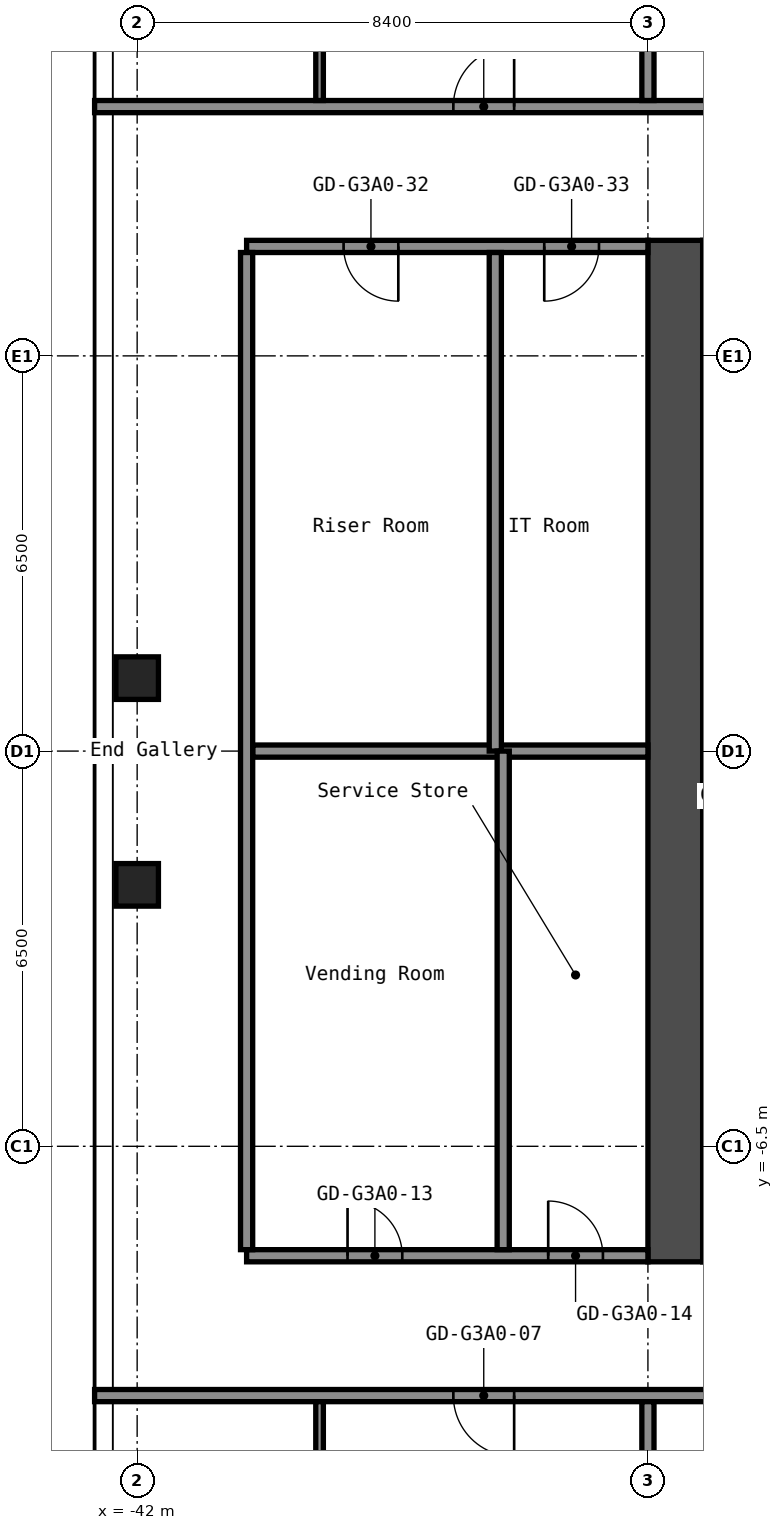
"""IFC4 building model, lengths in metres.
Left out: names, types, materials, properties, quantities, classifications, styles, units other than length and angle.
Written with IfcOpenShell. Run it as: python <this file> out.ifc"""

import sys

from ifc_helpers import new_model, si_unit, direction, frame, frame_2d, origin, origin_2d, place, context, subcontext, project, spatial, rectangle, hollow_rectangle, extrude, element, fill, save


model = new_model("IFC4")
c1 = context("Model", 3, precision=1e-05, world=origin(), true_north=direction((0.0, 1.0)))
c2 = subcontext(c1, "Body", "Model", "MODEL_VIEW")
j1 = project(units=[si_unit("LENGTHUNIT", "METRE"), si_unit("PLANEANGLEUNIT", "RADIAN")], contexts=[c1])
p1 = place(None, origin())
s1 = spatial("IfcSite", under=j1, at=p1, CompositionType="ELEMENT")
p2 = place(p1, origin())
s2 = spatial("IfcBuilding", under=s1, at=p2, CompositionType="ELEMENT")
p3 = place(p2, frame((0.0, 0.0, 131.0)))
s3 = spatial("IfcBuildingStorey", under=s2, at=p3, CompositionType="ELEMENT", Elevation=131.0)
for number, where, z_axis, x_axis in (
    (1, (-42.0, -2.2, 0.0), (0.0, 0.0, 1.0), (1.0, 0.0, 0.0)),
    (2, (-42.0, 1.2, 0.0), (0.0, 0.0, 1.0), (1.0, 0.0, 0.0)),
):
    element("IfcColumn", number, at=place(p3, frame(where, z_axis=z_axis, x_axis=x_axis)), inside=s3, PredefinedType="COLUMN", context=c2, shape_type="SweptSolid", body=[
        extrude(hollow_rectangle(XDim=0.7, YDim=0.7, WallThickness=0.028, at=origin_2d()), origin(), (0.0, 0.0, 1.0), 2.75),
    ])
p4 = place(p3, frame((-33.15, -8.4, 0.0), z_axis=(0.0, 0.0, 1.0), x_axis=(0.0, 1.0, 0.0)))
e3 = element("IfcWall", 3, at=p4, inside=s3, PredefinedType="SHEAR", context=c2, shape_type="SweptSolid", body=[
    extrude(rectangle(XDim=16.8, YDim=0.9, at=frame_2d((8.4, 0.0))), origin(), (0.0, 0.0, 1.0), 2.75),
])
p5 = place(p3, frame((-32.7, 1.325, 0.0), z_axis=(0.0, 0.0, 1.0), x_axis=(1.0, 0.0, 0.0)))
e4 = element("IfcWall", 4, at=p5, inside=s3, PredefinedType="SHEAR", context=c2, shape_type="SweptSolid", body=[
    extrude(rectangle(XDim=5.05, YDim=0.25, at=frame_2d((2.525, 0.0))), origin(), (0.0, 0.0, 1.0), 2.75),
])
p6 = place(p5, frame((3.3, 0.0, 0.0)))
e5 = element("IfcOpeningElement", 5, at=p6, cuts=e4, PredefinedType="OPENING", context=c2, shape_type="SweptSolid", body=[
    extrude(rectangle(XDim=1.2, YDim=2.1, at=frame_2d((0.6, 1.05))), frame((0.0, 0.135, 0.0), z_axis=(0.0, -1.0, 0.0), x_axis=(1.0, 0.0, 0.0)), (0.0, 0.0, 1.0), 0.27),
])
p7 = place(p3, frame((-32.7, -3.625, 0.0), z_axis=(0.0, 0.0, 1.0), x_axis=(1.0, 0.0, 0.0)))
e6 = element("IfcWall", 6, at=p7, inside=s3, PredefinedType="SHEAR", context=c2, shape_type="SweptSolid", body=[
    extrude(rectangle(XDim=4.55, YDim=0.25, at=frame_2d((2.275, 0.0))), origin(), (0.0, 0.0, 1.0), 2.75),
])
p8 = place(p7, frame((2.85, 0.0, 0.0)))
e7 = element("IfcOpeningElement", 7, at=p8, cuts=e6, PredefinedType="OPENING", context=c2, shape_type="SweptSolid", body=[
    extrude(rectangle(XDim=1.1, YDim=2.1, at=frame_2d((0.55, 1.05))), frame((0.0, 0.135, 0.0), z_axis=(0.0, -1.0, 0.0), x_axis=(1.0, 0.0, 0.0)), (0.0, 0.0, 1.0), 0.27),
])
p9 = place(p7, frame((0.6, 0.0, 0.0)))
e8 = element("IfcOpeningElement", 8, at=p9, cuts=e6, PredefinedType="OPENING", context=c2, shape_type="SweptSolid", body=[
    extrude(rectangle(XDim=1.1, YDim=2.1, at=frame_2d((0.55, 1.05))), frame((0.0, 0.135, 0.0), z_axis=(0.0, -1.0, 0.0), x_axis=(1.0, 0.0, 0.0)), (0.0, 0.0, 1.0), 0.27),
])
p10 = place(p3, frame((-32.7, -6.75, 0.0), z_axis=(0.0, 0.0, 1.0), x_axis=(1.0, 0.0, 0.0)))
e9 = element("IfcWall", 9, at=p10, inside=s3, PredefinedType="SHEAR", context=c2, shape_type="SweptSolid", body=[
    extrude(rectangle(XDim=4.55, YDim=1.5, at=frame_2d((2.275, 0.0))), origin(), (0.0, 0.0, 1.0), 2.75),
])
p11 = place(p3, frame((-42.7, -10.6, 0.0), z_axis=(0.0, 0.0, 1.0), x_axis=(1.0, 0.0, 0.0)))
e10 = element("IfcWall", 10, at=p11, inside=s3, PredefinedType="PARTITIONING", context=c2, shape_type="SweptSolid", body=[
    extrude(rectangle(XDim=25.9, YDim=0.2, at=frame_2d((12.95, 0.0))), origin(), (0.0, 0.0, 1.0), 2.75),
])
p12 = place(p11, frame((5.9, 0.0, 0.0)))
e11 = element("IfcOpeningElement", 11, at=p12, cuts=e10, PredefinedType="OPENING", context=c2, shape_type="SweptSolid", body=[
    extrude(rectangle(XDim=1.0, YDim=2.1, at=frame_2d((0.5, 1.05))), frame((0.0, 0.11, 0.0), z_axis=(0.0, -1.0, 0.0), x_axis=(1.0, 0.0, 0.0)), (0.0, 0.0, 1.0), 0.22),
])
p13 = place(p11, frame((11.1, 0.0, 0.0)))
e12 = element("IfcOpeningElement", 12, at=p13, cuts=e10, PredefinedType="OPENING", context=c2, shape_type="SweptSolid", body=[
    extrude(rectangle(XDim=1.0, YDim=2.1, at=frame_2d((0.5, 1.05))), frame((0.0, 0.11, 0.0), z_axis=(0.0, -1.0, 0.0), x_axis=(1.0, 0.0, 0.0)), (0.0, 0.0, 1.0), 0.22),
])
p14 = place(p11, frame((19.5, 0.0, 0.0)))
e13 = element("IfcOpeningElement", 13, at=p14, cuts=e10, PredefinedType="OPENING", context=c2, shape_type="SweptSolid", body=[
    extrude(rectangle(XDim=1.0, YDim=2.1, at=frame_2d((0.5, 1.05))), frame((0.0, 0.11, 0.0), z_axis=(0.0, -1.0, 0.0), x_axis=(1.0, 0.0, 0.0)), (0.0, 0.0, 1.0), 0.22),
])
p15 = place(p3, frame((-40.2, -8.3, 0.0), z_axis=(0.0, 0.0, 1.0), x_axis=(1.0, 0.0, 0.0)))
e14 = element("IfcWall", 14, at=p15, inside=s3, PredefinedType="PARTITIONING", context=c2, shape_type="SweptSolid", body=[
    extrude(rectangle(XDim=6.6, YDim=0.2, at=frame_2d((3.3, 0.0))), origin(), (0.0, 0.0, 1.0), 2.75),
])
p16 = place(p15, frame((1.66, 0.0, 0.0)))
e15 = element("IfcOpeningElement", 15, at=p16, cuts=e14, PredefinedType="OPENING", context=c2, shape_type="SweptSolid", body=[
    extrude(rectangle(XDim=0.9, YDim=2.1, at=frame_2d((0.45, 1.05))), frame((0.0, 0.11, 0.0), z_axis=(0.0, -1.0, 0.0), x_axis=(1.0, 0.0, 0.0)), (0.0, 0.0, 1.0), 0.22),
])
p17 = place(p15, frame((4.96, 0.0, 0.0)))
e16 = element("IfcOpeningElement", 16, at=p17, cuts=e14, PredefinedType="OPENING", context=c2, shape_type="SweptSolid", body=[
    extrude(rectangle(XDim=0.9, YDim=2.1, at=frame_2d((0.45, 1.05))), frame((0.0, 0.11, 0.0), z_axis=(0.0, -1.0, 0.0), x_axis=(1.0, 0.0, 0.0)), (0.0, 0.0, 1.0), 0.22),
])
p18 = place(p3, frame((-40.1, 0.0, 0.0), z_axis=(0.0, 0.0, 1.0), x_axis=(1.0, 0.0, 0.0)))
e17 = element("IfcWall", 17, at=p18, inside=s3, PredefinedType="PARTITIONING", context=c2, shape_type="SweptSolid", body=[
    extrude(rectangle(XDim=6.5, YDim=0.2, at=frame_2d((3.25, 0.0))), origin(), (0.0, 0.0, 1.0), 2.75),
])
p19 = place(p3, frame((-40.2, 8.3, 0.0), z_axis=(0.0, 0.0, 1.0), x_axis=(1.0, 0.0, 0.0)))
e18 = element("IfcWall", 18, at=p19, inside=s3, PredefinedType="PARTITIONING", context=c2, shape_type="SweptSolid", body=[
    extrude(rectangle(XDim=6.6, YDim=0.2, at=frame_2d((3.3, 0.0))), origin(), (0.0, 0.0, 1.0), 2.75),
])
p20 = place(p19, frame((1.595, 0.0, 0.0)))
e19 = element("IfcOpeningElement", 19, at=p20, cuts=e18, PredefinedType="OPENING", context=c2, shape_type="SweptSolid", body=[
    extrude(rectangle(XDim=0.9, YDim=2.1, at=frame_2d((0.45, 1.05))), frame((0.0, 0.11, 0.0), z_axis=(0.0, -1.0, 0.0), x_axis=(1.0, 0.0, 0.0)), (0.0, 0.0, 1.0), 0.22),
])
p21 = place(p19, frame((4.895, 0.0, 0.0)))
e20 = element("IfcOpeningElement", 20, at=p21, cuts=e18, PredefinedType="OPENING", context=c2, shape_type="SweptSolid", body=[
    extrude(rectangle(XDim=0.9, YDim=2.1, at=frame_2d((0.45, 1.05))), frame((0.0, 0.11, 0.0), z_axis=(0.0, -1.0, 0.0), x_axis=(1.0, 0.0, 0.0)), (0.0, 0.0, 1.0), 0.22),
])
p22 = place(p3, frame((-42.7, 10.6, 0.0), z_axis=(0.0, 0.0, 1.0), x_axis=(1.0, 0.0, 0.0)))
e21 = element("IfcWall", 21, at=p22, inside=s3, PredefinedType="PARTITIONING", context=c2, shape_type="SweptSolid", body=[
    extrude(rectangle(XDim=25.9, YDim=0.2, at=frame_2d((12.95, 0.0))), origin(), (0.0, 0.0, 1.0), 2.75),
])
p23 = place(p22, frame((5.9, 0.0, 0.0)))
e22 = element("IfcOpeningElement", 22, at=p23, cuts=e21, PredefinedType="OPENING", context=c2, shape_type="SweptSolid", body=[
    extrude(rectangle(XDim=1.0, YDim=2.1, at=frame_2d((0.5, 1.05))), frame((0.0, 0.11, 0.0), z_axis=(0.0, -1.0, 0.0), x_axis=(1.0, 0.0, 0.0)), (0.0, 0.0, 1.0), 0.22),
])
p24 = place(p22, frame((11.1, 0.0, 0.0)))
e23 = element("IfcOpeningElement", 23, at=p24, cuts=e21, PredefinedType="OPENING", context=c2, shape_type="SweptSolid", body=[
    extrude(rectangle(XDim=1.0, YDim=2.1, at=frame_2d((0.5, 1.05))), frame((0.0, 0.11, 0.0), z_axis=(0.0, -1.0, 0.0), x_axis=(1.0, 0.0, 0.0)), (0.0, 0.0, 1.0), 0.22),
])
p25 = place(p22, frame((19.5, 0.0, 0.0)))
e24 = element("IfcOpeningElement", 24, at=p25, cuts=e21, PredefinedType="OPENING", context=c2, shape_type="SweptSolid", body=[
    extrude(rectangle(XDim=1.0, YDim=2.1, at=frame_2d((0.5, 1.05))), frame((0.0, 0.11, 0.0), z_axis=(0.0, -1.0, 0.0), x_axis=(1.0, 0.0, 0.0)), (0.0, 0.0, 1.0), 0.22),
])
p26 = place(p3, frame((-40.2, -8.2, 0.0), z_axis=(0.0, 0.0, 1.0), x_axis=(0.0, 1.0, 0.0)))
e25 = element("IfcWall", 25, at=p26, inside=s3, PredefinedType="PARTITIONING", context=c2, shape_type="SweptSolid", body=[
    extrude(rectangle(XDim=16.4, YDim=0.2, at=frame_2d((8.2, 0.0))), origin(), (0.0, 0.0, 1.0), 2.75),
])
for number, where, z_axis, x_axis in (
    (26, (-39.0, -14.0, 0.0), (0.0, 0.0, 1.0), (0.0, 1.0, 0.0)),
    (27, (-39.0, 10.7, 0.0), (0.0, 0.0, 1.0), (0.0, 1.0, 0.0)),
):
    element("IfcWall", number, at=place(p3, frame(where, z_axis=z_axis, x_axis=x_axis)), inside=s3, PredefinedType="PARTITIONING", context=c2, shape_type="SweptSolid", body=[
        extrude(rectangle(XDim=3.3, YDim=0.125, at=frame_2d((1.65, 0.0))), origin(), (0.0, 0.0, 1.0), 2.75),
    ])
for number, where, z_axis, x_axis in (
    (28, (-36.11, 0.0, 0.0), (0.0, 0.0, 1.0), (0.0, 1.0, 0.0)),
    (29, (-35.98, -8.2, 0.0), (0.0, 0.0, 1.0), (0.0, 1.0, 0.0)),
):
    element("IfcWall", number, at=place(p3, frame(where, z_axis=z_axis, x_axis=x_axis)), inside=s3, PredefinedType="PARTITIONING", context=c2, shape_type="SweptSolid", body=[
        extrude(rectangle(XDim=8.2, YDim=0.2, at=frame_2d((4.1, 0.0))), origin(), (0.0, 0.0, 1.0), 2.75),
    ])
p27 = place(p3, frame((-33.6, -19.3, 0.0), z_axis=(0.0, 0.0, 1.0), x_axis=(0.0, 1.0, 0.0)))
e30 = element("IfcWall", 30, at=p27, inside=s3, PredefinedType="PARTITIONING", context=c2, shape_type="SweptSolid", body=[
    extrude(rectangle(XDim=8.6, YDim=0.2, at=frame_2d((4.3, 0.0))), origin(), (0.0, 0.0, 1.0), 2.75),
])
p28 = place(p3, frame((-33.6, 10.7, 0.0), z_axis=(0.0, 0.0, 1.0), x_axis=(0.0, 1.0, 0.0)))
e31 = element("IfcWall", 31, at=p28, inside=s3, PredefinedType="PARTITIONING", context=c2, shape_type="SweptSolid", body=[
    extrude(rectangle(XDim=7.6, YDim=0.2, at=frame_2d((3.8, 0.0))), origin(), (0.0, 0.0, 1.0), 2.75),
])
p29 = place(p12, origin())
e32 = element("IfcDoor", 32, at=p29, inside=s3, OperationType="SINGLE_SWING_RIGHT", PredefinedType="DOOR", context=c2, shape_type="SweptSolid", body=[
    extrude(rectangle(XDim=1.0, YDim=2.1, at=frame_2d((0.5, 1.05))), frame((0.0, 0.025, 0.0), z_axis=(0.0, -1.0, 0.0), x_axis=(1.0, 0.0, 0.0)), (0.0, 0.0, 1.0), 0.05),
])
fill(e11, e32)
p30 = place(p16, origin())
e33 = element("IfcDoor", 33, at=p30, inside=s3, OperationType="SINGLE_SWING_RIGHT", PredefinedType="DOOR", context=c2, shape_type="SweptSolid", body=[
    extrude(rectangle(XDim=0.9, YDim=2.1, at=frame_2d((0.45, 1.05))), frame((0.0, 0.025, 0.0), z_axis=(0.0, -1.0, 0.0), x_axis=(1.0, 0.0, 0.0)), (0.0, 0.0, 1.0), 0.05),
])
fill(e15, e33)
p31 = place(p17, origin())
e34 = element("IfcDoor", 34, at=p31, inside=s3, OperationType="SINGLE_SWING_RIGHT", PredefinedType="DOOR", context=c2, shape_type="SweptSolid", body=[
    extrude(rectangle(XDim=0.9, YDim=2.1, at=frame_2d((0.45, 1.05))), frame((0.0, 0.025, 0.0), z_axis=(0.0, -1.0, 0.0), x_axis=(1.0, 0.0, 0.0)), (0.0, 0.0, 1.0), 0.05),
])
fill(e16, e34)
p32 = place(p20, origin())
e35 = element("IfcDoor", 35, at=p32, inside=s3, OperationType="SINGLE_SWING_RIGHT", PredefinedType="DOOR", context=c2, shape_type="SweptSolid", body=[
    extrude(rectangle(XDim=0.9, YDim=2.1, at=frame_2d((0.45, 1.05))), frame((0.0, 0.025, 0.0), z_axis=(0.0, -1.0, 0.0), x_axis=(1.0, 0.0, 0.0)), (0.0, 0.0, 1.0), 0.05),
])
fill(e19, e35)
p33 = place(p21, origin())
e36 = element("IfcDoor", 36, at=p33, inside=s3, OperationType="SINGLE_SWING_LEFT", PredefinedType="DOOR", context=c2, shape_type="SweptSolid", body=[
    extrude(rectangle(XDim=0.9, YDim=2.1, at=frame_2d((0.45, 1.05))), frame((0.0, 0.025, 0.0), z_axis=(0.0, -1.0, 0.0), x_axis=(1.0, 0.0, 0.0)), (0.0, 0.0, 1.0), 0.05),
])
fill(e20, e36)
p34 = place(p23, origin())
e37 = element("IfcDoor", 37, at=p34, inside=s3, OperationType="SINGLE_SWING_LEFT", PredefinedType="DOOR", context=c2, shape_type="SweptSolid", body=[
    extrude(rectangle(XDim=1.0, YDim=2.1, at=frame_2d((0.5, 1.05))), frame((0.0, 0.025, 0.0), z_axis=(0.0, -1.0, 0.0), x_axis=(1.0, 0.0, 0.0)), (0.0, 0.0, 1.0), 0.05),
])
fill(e22, e37)
save(model, sys.argv[1])
